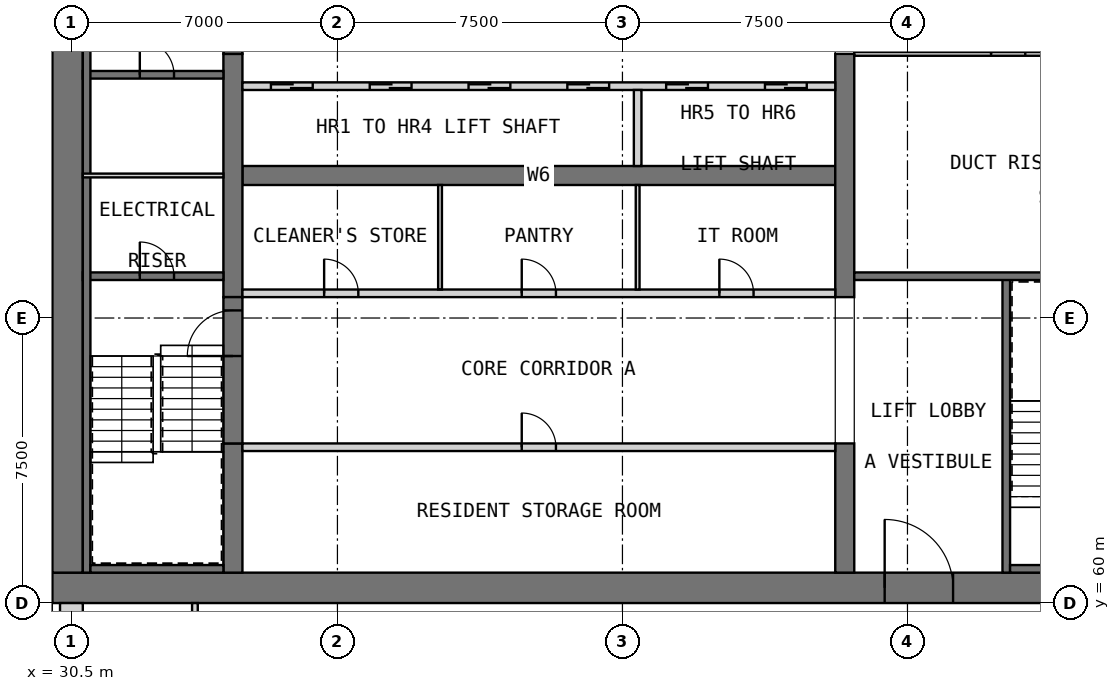
"""IFC4 building model, lengths in metres.
Left out: names, types, materials, properties, quantities, classifications, styles, units other than length and angle.
Written with IfcOpenShell. Run it as: python <this file> out.ifc"""

import sys

from ifc_helpers import new_model, si_unit, direction, frame, frame_2d, origin, place, context, subcontext, project, spatial, rectangle, extrude, element, fill, save


model = new_model("IFC4")
c1 = context("Model", 3, precision=1e-05, world=origin(), true_north=direction((0.0, 1.0)))
c2 = subcontext(c1, "Body", "Model", "MODEL_VIEW")
j1 = project(units=[si_unit("LENGTHUNIT", "METRE"), si_unit("PLANEANGLEUNIT", "RADIAN")], contexts=[c1])
p1 = place(None, origin())
s1 = spatial("IfcSite", under=j1, at=p1, CompositionType="ELEMENT")
p2 = place(p1, origin())
s2 = spatial("IfcBuilding", under=s1, at=p2, CompositionType="ELEMENT")
p3 = place(p2, frame((0.0, 0.0, 182.7)))
s3 = spatial("IfcBuildingStorey", under=s2, at=p3, CompositionType="ELEMENT", Elevation=182.7)
p4 = place(p3, frame((30.0, 60.4, 0.0), z_axis=(0.0, 0.0, 1.0), x_axis=(1.0, 0.0, 0.0)))
e1 = element("IfcWall", 1, at=p4, inside=s3, PredefinedType="SHEAR", context=c2, shape_type="SweptSolid", body=[
    extrude(rectangle(XDim=30.0, YDim=0.8, at=frame_2d((15.0, 0.0))), origin(), (0.0, 0.0, 1.0), 3.5),
])
p5 = place(p4, frame((21.9, 0.0, 0.0)))
e2 = element("IfcOpeningElement", 2, at=p5, cuts=e1, PredefinedType="OPENING", context=c2, shape_type="SweptSolid", body=[
    extrude(rectangle(XDim=1.8, YDim=2.1, at=frame_2d((0.9, 1.05))), frame((0.0, 0.41, 0.0), z_axis=(0.0, -1.0, 0.0), x_axis=(1.0, 0.0, 0.0)), (0.0, 0.0, 1.0), 0.82),
])
p6 = place(p4, frame((26.5, 0.0, 0.0)))
e3 = element("IfcOpeningElement", 3, at=p6, cuts=e1, PredefinedType="OPENING", context=c2, shape_type="SweptSolid", body=[
    extrude(rectangle(XDim=1.2, YDim=2.1, at=frame_2d((0.6, 1.05))), frame((0.0, 0.41, 0.0), z_axis=(0.0, -1.0, 0.0), x_axis=(1.0, 0.0, 0.0)), (0.0, 0.0, 1.0), 0.82),
])
p7 = place(p3, frame((30.4, 60.8, 0.0), z_axis=(0.0, 0.0, 1.0), x_axis=(0.0, 1.0, 0.0)))
e4 = element("IfcWall", 4, at=p7, inside=s3, PredefinedType="SHEAR", context=c2, shape_type="SweptSolid", body=[
    extrude(rectangle(XDim=20.9, YDim=0.8, at=frame_2d((10.45, 0.0))), origin(), (0.0, 0.0, 1.0), 3.5),
])
p8 = place(p3, frame((35.0, 71.25, 0.0), z_axis=(0.0, 0.0, 1.0), x_axis=(1.0, 0.0, 0.0)))
e5 = element("IfcWall", 5, at=p8, inside=s3, PredefinedType="SHEAR", context=c2, shape_type="SweptSolid", body=[
    extrude(rectangle(XDim=15.6, YDim=0.5, at=frame_2d((7.8, 0.0))), origin(), (0.0, 0.0, 1.0), 3.5),
])
p9 = place(p3, frame((34.75, 60.8, 0.0), z_axis=(0.0, 0.0, 1.0), x_axis=(0.0, 1.0, 0.0)))
e6 = element("IfcWall", 6, at=p9, inside=s3, PredefinedType="SHEAR", context=c2, shape_type="SweptSolid", body=[
    extrude(rectangle(XDim=3.4, YDim=0.5, at=frame_2d((1.7, 0.0))), origin(), (0.0, 0.0, 1.0), 3.5),
])
p10 = place(p3, frame((34.75, 68.05, 0.0), z_axis=(0.0, 0.0, 1.0), x_axis=(0.0, 1.0, 0.0)))
e7 = element("IfcWall", 7, at=p10, inside=s3, PredefinedType="SHEAR", context=c2, shape_type="SweptSolid", body=[
    extrude(rectangle(XDim=6.4, YDim=0.5, at=frame_2d((3.2, 0.0))), origin(), (0.0, 0.0, 1.0), 3.5),
])
p11 = place(p3, frame((50.85, 60.8, 0.0), z_axis=(0.0, 0.0, 1.0), x_axis=(0.0, 1.0, 0.0)))
e8 = element("IfcWall", 8, at=p11, inside=s3, PredefinedType="SHEAR", context=c2, shape_type="SweptSolid", body=[
    extrude(rectangle(XDim=3.4, YDim=0.5, at=frame_2d((1.7, 0.0))), origin(), (0.0, 0.0, 1.0), 3.5),
])
p12 = place(p3, frame((50.85, 68.05, 0.0), z_axis=(0.0, 0.0, 1.0), x_axis=(0.0, 1.0, 0.0)))
e9 = element("IfcWall", 9, at=p12, inside=s3, PredefinedType="SHEAR", context=c2, shape_type="SweptSolid", body=[
    extrude(rectangle(XDim=6.4, YDim=0.5, at=frame_2d((3.2, 0.0))), origin(), (0.0, 0.0, 1.0), 3.5),
])
p13 = place(p3, frame((30.5, 60.0, 0.0), z_axis=(0.0, 0.0, 1.0), x_axis=(0.0, -1.0, 0.0)))
e10 = element("IfcWall", 10, at=p13, inside=s3, PredefinedType="SOLIDWALL", context=c2, shape_type="SweptSolid", body=[
    extrude(rectangle(XDim=7.0, YDim=0.6, at=frame_2d((3.5, 0.0))), origin(), (0.0, 0.0, 1.0), 3.25),
])
p14 = place(p13, frame((4.175, 0.0, 0.8)))
e11 = element("IfcOpeningElement", 11, at=p14, cuts=e10, PredefinedType="OPENING", context=c2, shape_type="SweptSolid", body=[
    extrude(rectangle(XDim=2.4, YDim=1.8, at=frame_2d((1.2, 0.9))), frame((0.0, 0.31, 0.0), z_axis=(0.0, -1.0, 0.0), x_axis=(1.0, 0.0, 0.0)), (0.0, 0.0, 1.0), 0.62),
])
p15 = place(p13, frame((0.675, 0.0, 0.8)))
e12 = element("IfcOpeningElement", 12, at=p15, cuts=e10, PredefinedType="OPENING", context=c2, shape_type="SweptSolid", body=[
    extrude(rectangle(XDim=2.4, YDim=1.8, at=frame_2d((1.2, 0.9))), frame((0.0, 0.31, 0.0), z_axis=(0.0, -1.0, 0.0), x_axis=(1.0, 0.0, 0.0)), (0.0, 0.0, 1.0), 0.62),
])
p16 = place(p3, frame((35.0, 64.1, 0.0), z_axis=(0.0, 0.0, 1.0), x_axis=(1.0, 0.0, 0.0)))
e13 = element("IfcWall", 13, at=p16, inside=s3, PredefinedType="PARTITIONING", context=c2, shape_type="SweptSolid", body=[
    extrude(rectangle(XDim=15.6, YDim=0.2, at=frame_2d((7.8, 0.0))), origin(), (0.0, 0.0, 1.0), 3.25),
])
p17 = place(p16, frame((7.35, 0.0, 0.0)))
e14 = element("IfcOpeningElement", 14, at=p17, cuts=e13, PredefinedType="OPENING", context=c2, shape_type="SweptSolid", body=[
    extrude(rectangle(XDim=0.9, YDim=2.1, at=frame_2d((0.45, 1.05))), frame((0.0, 0.11, 0.0), z_axis=(0.0, -1.0, 0.0), x_axis=(1.0, 0.0, 0.0)), (0.0, 0.0, 1.0), 0.22),
])
p18 = place(p3, frame((35.0, 68.15, 0.0), z_axis=(0.0, 0.0, 1.0), x_axis=(1.0, 0.0, 0.0)))
e15 = element("IfcWall", 15, at=p18, inside=s3, PredefinedType="PARTITIONING", context=c2, shape_type="SweptSolid", body=[
    extrude(rectangle(XDim=15.6, YDim=0.2, at=frame_2d((7.8, 0.0))), origin(), (0.0, 0.0, 1.0), 3.25),
])
p19 = place(p18, frame((2.15, 0.0, 0.0)))
e16 = element("IfcOpeningElement", 16, at=p19, cuts=e15, PredefinedType="OPENING", context=c2, shape_type="SweptSolid", body=[
    extrude(rectangle(XDim=0.9, YDim=2.1, at=frame_2d((0.45, 1.05))), frame((0.0, 0.11, 0.0), z_axis=(0.0, -1.0, 0.0), x_axis=(1.0, 0.0, 0.0)), (0.0, 0.0, 1.0), 0.22),
])
p20 = place(p18, frame((7.35, 0.0, 0.0)))
e17 = element("IfcOpeningElement", 17, at=p20, cuts=e15, PredefinedType="OPENING", context=c2, shape_type="SweptSolid", body=[
    extrude(rectangle(XDim=0.9, YDim=2.1, at=frame_2d((0.45, 1.05))), frame((0.0, 0.11, 0.0), z_axis=(0.0, -1.0, 0.0), x_axis=(1.0, 0.0, 0.0)), (0.0, 0.0, 1.0), 0.22),
])
p21 = place(p18, frame((12.55, 0.0, 0.0)))
e18 = element("IfcOpeningElement", 18, at=p21, cuts=e15, PredefinedType="OPENING", context=c2, shape_type="SweptSolid", body=[
    extrude(rectangle(XDim=0.9, YDim=2.1, at=frame_2d((0.45, 1.05))), frame((0.0, 0.11, 0.0), z_axis=(0.0, -1.0, 0.0), x_axis=(1.0, 0.0, 0.0)), (0.0, 0.0, 1.0), 0.22),
])
for number, where, z_axis, x_axis in (
    (19, (40.2, 68.25, 0.0), (0.0, 0.0, 1.0), (0.0, 1.0, 0.0)),
    (20, (45.4, 68.25, 0.0), (0.0, 0.0, 1.0), (0.0, 1.0, 0.0)),
):
    element("IfcWall", number, at=place(p3, frame(where, z_axis=z_axis, x_axis=x_axis)), inside=s3, PredefinedType="PARTITIONING", context=c2, shape_type="SweptSolid", body=[
        extrude(rectangle(XDim=2.75, YDim=0.1, at=frame_2d((1.375, 0.0))), origin(), (0.0, 0.0, 1.0), 3.25),
    ])
p22 = place(p3, frame((35.0, 73.6, 0.0), z_axis=(0.0, 0.0, 1.0), x_axis=(1.0, 0.0, 0.0)))
e21 = element("IfcWall", 21, at=p22, inside=s3, PredefinedType="SOLIDWALL", context=c2, shape_type="SweptSolid", body=[
    extrude(rectangle(XDim=15.6, YDim=0.2, at=frame_2d((7.8, 0.0))), origin(), (0.0, 0.0, 1.0), 3.5),
])
p23 = place(p22, frame((0.75, 0.0, 0.0)))
e22 = element("IfcOpeningElement", 22, at=p23, cuts=e21, PredefinedType="OPENING", context=c2, shape_type="SweptSolid", body=[
    extrude(rectangle(XDim=1.1, YDim=2.1, at=frame_2d((0.55, 1.05))), frame((0.0, 0.11, 0.0), z_axis=(0.0, -1.0, 0.0), x_axis=(1.0, 0.0, 0.0)), (0.0, 0.0, 1.0), 0.22),
])
p24 = place(p22, frame((3.35, 0.0, 0.0)))
e23 = element("IfcOpeningElement", 23, at=p24, cuts=e21, PredefinedType="OPENING", context=c2, shape_type="SweptSolid", body=[
    extrude(rectangle(XDim=1.1, YDim=2.1, at=frame_2d((0.55, 1.05))), frame((0.0, 0.11, 0.0), z_axis=(0.0, -1.0, 0.0), x_axis=(1.0, 0.0, 0.0)), (0.0, 0.0, 1.0), 0.22),
])
p25 = place(p22, frame((5.95, 0.0, 0.0)))
e24 = element("IfcOpeningElement", 24, at=p25, cuts=e21, PredefinedType="OPENING", context=c2, shape_type="SweptSolid", body=[
    extrude(rectangle(XDim=1.1, YDim=2.1, at=frame_2d((0.55, 1.05))), frame((0.0, 0.11, 0.0), z_axis=(0.0, -1.0, 0.0), x_axis=(1.0, 0.0, 0.0)), (0.0, 0.0, 1.0), 0.22),
])
p26 = place(p22, frame((8.55, 0.0, 0.0)))
e25 = element("IfcOpeningElement", 25, at=p26, cuts=e21, PredefinedType="OPENING", context=c2, shape_type="SweptSolid", body=[
    extrude(rectangle(XDim=1.1, YDim=2.1, at=frame_2d((0.55, 1.05))), frame((0.0, 0.11, 0.0), z_axis=(0.0, -1.0, 0.0), x_axis=(1.0, 0.0, 0.0)), (0.0, 0.0, 1.0), 0.22),
])
p27 = place(p22, frame((11.15, 0.0, 0.0)))
e26 = element("IfcOpeningElement", 26, at=p27, cuts=e21, PredefinedType="OPENING", context=c2, shape_type="SweptSolid", body=[
    extrude(rectangle(XDim=1.1, YDim=2.1, at=frame_2d((0.55, 1.05))), frame((0.0, 0.11, 0.0), z_axis=(0.0, -1.0, 0.0), x_axis=(1.0, 0.0, 0.0)), (0.0, 0.0, 1.0), 0.22),
])
p28 = place(p22, frame((13.75, 0.0, 0.0)))
e27 = element("IfcOpeningElement", 27, at=p28, cuts=e21, PredefinedType="OPENING", context=c2, shape_type="SweptSolid", body=[
    extrude(rectangle(XDim=1.1, YDim=2.1, at=frame_2d((0.55, 1.05))), frame((0.0, 0.11, 0.0), z_axis=(0.0, -1.0, 0.0), x_axis=(1.0, 0.0, 0.0)), (0.0, 0.0, 1.0), 0.22),
])
p29 = place(p3, frame((45.4, 71.5, 0.0), z_axis=(0.0, 0.0, 1.0), x_axis=(0.0, 1.0, 0.0)))
e28 = element("IfcWall", 28, at=p29, inside=s3, PredefinedType="SOLIDWALL", context=c2, shape_type="SweptSolid", body=[
    extrude(rectangle(XDim=2.0, YDim=0.2, at=frame_2d((1.0, 0.0))), origin(), (0.0, 0.0, 1.0), 3.5),
])
p30 = place(p3, frame((34.75, 64.2, 0.0), z_axis=(0.0, 0.0, 1.0), x_axis=(0.0, 1.0, 0.0)))
e29 = element("IfcWall", 29, at=p30, inside=s3, PredefinedType="SOLIDWALL", context=c2, shape_type="SweptSolid", body=[
    extrude(rectangle(XDim=3.85, YDim=0.5, at=frame_2d((1.925, 0.0))), origin(), (0.0, 0.0, 1.0), 2.3),
])
p31 = place(p30, frame((2.3, 0.0, 0.0)))
e30 = element("IfcOpeningElement", 30, at=p31, cuts=e29, PredefinedType="OPENING", context=c2, shape_type="SweptSolid", body=[
    extrude(rectangle(XDim=1.2, YDim=2.1, at=frame_2d((0.6, 1.05))), frame((0.0, 0.26, 0.0), z_axis=(0.0, -1.0, 0.0), x_axis=(1.0, 0.0, 0.0)), (0.0, 0.0, 1.0), 0.52),
])
p32 = place(p3, frame((34.75, 74.45, 0.0), z_axis=(0.0, 0.0, 1.0), x_axis=(0.0, 1.0, 0.0)))
e31 = element("IfcWall", 31, at=p32, inside=s3, PredefinedType="SOLIDWALL", context=c2, shape_type="SweptSolid", body=[
    extrude(rectangle(XDim=3.85, YDim=0.5, at=frame_2d((1.925, 0.0))), origin(), (0.0, 0.0, 1.0), 2.3),
])
p33 = place(p32, frame((1.0, 0.0, 0.0)))
e32 = element("IfcOpeningElement", 32, at=p33, cuts=e31, PredefinedType="OPENING", context=c2, shape_type="SweptSolid", body=[
    extrude(rectangle(XDim=1.2, YDim=2.1, at=frame_2d((0.6, 1.05))), frame((0.0, 0.26, 0.0), z_axis=(0.0, -1.0, 0.0), x_axis=(1.0, 0.0, 0.0)), (0.0, 0.0, 1.0), 0.52),
])
p34 = place(p3, frame((30.8, 68.6, 0.0), z_axis=(0.0, 0.0, 1.0), x_axis=(1.0, 0.0, 0.0)))
e33 = element("IfcWall", 33, at=p34, inside=s3, PredefinedType="SOLIDWALL", context=c2, shape_type="SweptSolid", body=[
    extrude(rectangle(XDim=3.7, YDim=0.2, at=frame_2d((1.85, 0.0))), origin(), (0.0, 0.0, 1.0), 3.25),
])
p35 = place(p34, frame((1.5, 0.0, 0.0)))
e34 = element("IfcOpeningElement", 34, at=p35, cuts=e33, PredefinedType="OPENING", context=c2, shape_type="SweptSolid", body=[
    extrude(rectangle(XDim=0.9, YDim=2.1, at=frame_2d((0.45, 1.05))), frame((0.0, 0.11, 0.0), z_axis=(0.0, -1.0, 0.0), x_axis=(1.0, 0.0, 0.0)), (0.0, 0.0, 1.0), 0.22),
])
p36 = place(p3, frame((30.8, 73.9, 0.0), z_axis=(0.0, 0.0, 1.0), x_axis=(1.0, 0.0, 0.0)))
e35 = element("IfcWall", 35, at=p36, inside=s3, PredefinedType="SOLIDWALL", context=c2, shape_type="SweptSolid", body=[
    extrude(rectangle(XDim=3.7, YDim=0.2, at=frame_2d((1.85, 0.0))), origin(), (0.0, 0.0, 1.0), 3.25),
])
p37 = place(p36, frame((1.5, 0.0, 0.0)))
e36 = element("IfcOpeningElement", 36, at=p37, cuts=e35, PredefinedType="OPENING", context=c2, shape_type="SweptSolid", body=[
    extrude(rectangle(XDim=0.9, YDim=2.1, at=frame_2d((0.45, 1.05))), frame((0.0, 0.11, 0.0), z_axis=(0.0, -1.0, 0.0), x_axis=(1.0, 0.0, 0.0)), (0.0, 0.0, 1.0), 0.22),
])
p38 = place(p3, frame((55.1, 60.8, 0.0), z_axis=(0.0, 0.0, 1.0), x_axis=(0.0, 1.0, 0.0)))
e37 = element("IfcWall", 37, at=p38, inside=s3, PredefinedType="SOLIDWALL", context=c2, shape_type="SweptSolid", body=[
    extrude(rectangle(XDim=7.8, YDim=0.2, at=frame_2d((3.9, 0.0))), origin(), (0.0, 0.0, 1.0), 3.25),
])
p39 = place(p3, frame((51.1, 68.6, 0.0), z_axis=(0.0, 0.0, 1.0), x_axis=(1.0, 0.0, 0.0)))
e38 = element("IfcWall", 38, at=p39, inside=s3, PredefinedType="SOLIDWALL", context=c2, shape_type="SweptSolid", body=[
    extrude(rectangle(XDim=8.1, YDim=0.2, at=frame_2d((4.05, 0.0))), origin(), (0.0, 0.0, 1.0), 3.25),
])
p40 = place(p3, frame((30.9, 60.8, 0.0), z_axis=(0.0, 0.0, 1.0), x_axis=(0.0, 1.0, 0.0)))
e39 = element("IfcWall", 39, at=p40, inside=s3, PredefinedType="SOLIDWALL", context=c2, shape_type="SweptSolid", body=[
    extrude(rectangle(XDim=20.9, YDim=0.2, at=frame_2d((10.45, 0.0))), origin(), (0.0, 0.0, 1.0), 3.25),
])
p41 = place(p3, frame((31.0, 60.9, 0.0), z_axis=(0.0, 0.0, 1.0), x_axis=(1.0, 0.0, 0.0)))
e40 = element("IfcWall", 40, at=p41, inside=s3, PredefinedType="SOLIDWALL", context=c2, shape_type="SweptSolid", body=[
    extrude(rectangle(XDim=3.5, YDim=0.2, at=frame_2d((1.75, 0.0))), origin(), (0.0, 0.0, 1.0), 3.25),
])
p42 = place(p3, frame((55.2, 60.9, 0.0), z_axis=(0.0, 0.0, 1.0), x_axis=(1.0, 0.0, 0.0)))
e41 = element("IfcWall", 41, at=p42, inside=s3, PredefinedType="SOLIDWALL", context=c2, shape_type="SweptSolid", body=[
    extrude(rectangle(XDim=1.3, YDim=0.2, at=frame_2d((0.65, 0.0))), origin(), (0.0, 0.0, 1.0), 3.25),
])
p43 = place(p3, frame((30.8, 71.25, 0.0), z_axis=(0.0, 0.0, 1.0), x_axis=(1.0, 0.0, 0.0)))
e42 = element("IfcWall", 42, at=p43, inside=s3, PredefinedType="PARTITIONING", context=c2, shape_type="SweptSolid", body=[
    extrude(rectangle(XDim=3.7, YDim=0.1, at=frame_2d((1.85, 0.0))), origin(), (0.0, 0.0, 1.0), 3.25),
])
p44 = place(p3, frame((51.1, 74.45, 0.0), z_axis=(0.0, 0.0, 1.0), x_axis=(1.0, 0.0, 0.0)))
e43 = element("IfcWall", 43, at=p44, inside=s3, PredefinedType="PARTITIONING", context=c2, shape_type="SweptSolid", body=[
    extrude(rectangle(XDim=8.1, YDim=0.1, at=frame_2d((4.05, 0.0))), origin(), (0.0, 0.0, 1.0), 3.25),
])
p45 = place(p44, frame((3.6, 0.0, 0.0)))
e44 = element("IfcOpeningElement", 44, at=p45, cuts=e43, PredefinedType="OPENING", context=c2, shape_type="SweptSolid", body=[
    extrude(rectangle(XDim=0.9, YDim=2.1, at=frame_2d((0.45, 1.05))), frame((0.0, 0.06, 0.0), z_axis=(0.0, -1.0, 0.0), x_axis=(1.0, 0.0, 0.0)), (0.0, 0.0, 1.0), 0.12),
])
p46 = place(p3, frame((33.75, 57.975, 0.0), z_axis=(0.0, 0.0, 1.0), x_axis=(0.0, 1.0, 0.0)))
e45 = element("IfcWall", 45, at=p46, inside=s3, PredefinedType="PARTITIONING", context=c2, shape_type="SweptSolid", body=[
    extrude(rectangle(XDim=2.025, YDim=0.15, at=frame_2d((1.012, 0.0))), origin(), (0.0, 0.0, 1.0), 3.25),
])
p47 = place(p17, origin())
e46 = element("IfcDoor", 46, at=p47, inside=s3, OperationType="SINGLE_SWING_RIGHT", PredefinedType="DOOR", context=c2, shape_type="SweptSolid", body=[
    extrude(rectangle(XDim=0.9, YDim=2.1, at=frame_2d((0.45, 1.05))), frame((0.0, 0.025, 0.0), z_axis=(0.0, -1.0, 0.0), x_axis=(1.0, 0.0, 0.0)), (0.0, 0.0, 1.0), 0.05),
])
fill(e14, e46)
p48 = place(p19, origin())
e47 = element("IfcDoor", 47, at=p48, inside=s3, OperationType="SINGLE_SWING_RIGHT", PredefinedType="DOOR", context=c2, shape_type="SweptSolid", body=[
    extrude(rectangle(XDim=0.9, YDim=2.1, at=frame_2d((0.45, 1.05))), frame((0.0, 0.025, 0.0), z_axis=(0.0, -1.0, 0.0), x_axis=(1.0, 0.0, 0.0)), (0.0, 0.0, 1.0), 0.05),
])
fill(e16, e47)
p49 = place(p20, origin())
e48 = element("IfcDoor", 48, at=p49, inside=s3, OperationType="SINGLE_SWING_LEFT", PredefinedType="DOOR", context=c2, shape_type="SweptSolid", body=[
    extrude(rectangle(XDim=0.9, YDim=2.1, at=frame_2d((0.45, 1.05))), frame((0.0, 0.025, 0.0), z_axis=(0.0, -1.0, 0.0), x_axis=(1.0, 0.0, 0.0)), (0.0, 0.0, 1.0), 0.05),
])
fill(e17, e48)
p50 = place(p21, origin())
e49 = element("IfcDoor", 49, at=p50, inside=s3, OperationType="SINGLE_SWING_RIGHT", PredefinedType="DOOR", context=c2, shape_type="SweptSolid", body=[
    extrude(rectangle(XDim=0.9, YDim=2.1, at=frame_2d((0.45, 1.05))), frame((0.0, 0.025, 0.0), z_axis=(0.0, -1.0, 0.0), x_axis=(1.0, 0.0, 0.0)), (0.0, 0.0, 1.0), 0.05),
])
fill(e18, e49)
p51 = place(p23, origin())
e50 = element("IfcDoor", 50, at=p51, inside=s3, OperationType="DOUBLE_DOOR_SLIDING", PredefinedType="DOOR", context=c2, shape_type="SweptSolid", body=[
    extrude(rectangle(XDim=1.1, YDim=2.1, at=frame_2d((0.55, 1.05))), frame((0.0, 0.025, 0.0), z_axis=(0.0, -1.0, 0.0), x_axis=(1.0, 0.0, 0.0)), (0.0, 0.0, 1.0), 0.05),
])
fill(e22, e50)
p52 = place(p24, origin())
e51 = element("IfcDoor", 51, at=p52, inside=s3, OperationType="DOUBLE_DOOR_SLIDING", PredefinedType="DOOR", context=c2, shape_type="SweptSolid", body=[
    extrude(rectangle(XDim=1.1, YDim=2.1, at=frame_2d((0.55, 1.05))), frame((0.0, 0.025, 0.0), z_axis=(0.0, -1.0, 0.0), x_axis=(1.0, 0.0, 0.0)), (0.0, 0.0, 1.0), 0.05),
])
fill(e23, e51)
p53 = place(p25, origin())
e52 = element("IfcDoor", 52, at=p53, inside=s3, OperationType="DOUBLE_DOOR_SLIDING", PredefinedType="DOOR", context=c2, shape_type="SweptSolid", body=[
    extrude(rectangle(XDim=1.1, YDim=2.1, at=frame_2d((0.55, 1.05))), frame((0.0, 0.025, 0.0), z_axis=(0.0, -1.0, 0.0), x_axis=(1.0, 0.0, 0.0)), (0.0, 0.0, 1.0), 0.05),
])
fill(e24, e52)
p54 = place(p26, origin())
e53 = element("IfcDoor", 53, at=p54, inside=s3, OperationType="DOUBLE_DOOR_SLIDING", PredefinedType="DOOR", context=c2, shape_type="SweptSolid", body=[
    extrude(rectangle(XDim=1.1, YDim=2.1, at=frame_2d((0.55, 1.05))), frame((0.0, 0.025, 0.0), z_axis=(0.0, -1.0, 0.0), x_axis=(1.0, 0.0, 0.0)), (0.0, 0.0, 1.0), 0.05),
])
fill(e25, e53)
p55 = place(p27, origin())
e54 = element("IfcDoor", 54, at=p55, inside=s3, OperationType="DOUBLE_DOOR_SLIDING", PredefinedType="DOOR", context=c2, shape_type="SweptSolid", body=[
    extrude(rectangle(XDim=1.1, YDim=2.1, at=frame_2d((0.55, 1.05))), frame((0.0, 0.025, 0.0), z_axis=(0.0, -1.0, 0.0), x_axis=(1.0, 0.0, 0.0)), (0.0, 0.0, 1.0), 0.05),
])
fill(e26, e54)
p56 = place(p28, origin())
e55 = element("IfcDoor", 55, at=p56, inside=s3, OperationType="DOUBLE_DOOR_SLIDING", PredefinedType="DOOR", context=c2, shape_type="SweptSolid", body=[
    extrude(rectangle(XDim=1.1, YDim=2.1, at=frame_2d((0.55, 1.05))), frame((0.0, 0.025, 0.0), z_axis=(0.0, -1.0, 0.0), x_axis=(1.0, 0.0, 0.0)), (0.0, 0.0, 1.0), 0.05),
])
fill(e27, e55)
p57 = place(p5, origin())
e56 = element("IfcDoor", 56, at=p57, inside=s3, OperationType="DOUBLE_DOOR_SINGLE_SWING", PredefinedType="DOOR", context=c2, shape_type="SweptSolid", body=[
    extrude(rectangle(XDim=1.8, YDim=2.1, at=frame_2d((0.9, 1.05))), frame((0.0, 0.025, 0.0), z_axis=(0.0, -1.0, 0.0), x_axis=(1.0, 0.0, 0.0)), (0.0, 0.0, 1.0), 0.05),
])
fill(e2, e56)
p58 = place(p31, origin())
e57 = element("IfcDoor", 57, at=p58, inside=s3, OperationType="SINGLE_SWING_LEFT", PredefinedType="DOOR", context=c2, shape_type="SweptSolid", body=[
    extrude(rectangle(XDim=1.2, YDim=2.1, at=frame_2d((0.6, 1.05))), frame((0.0, 0.025, 0.0), z_axis=(0.0, -1.0, 0.0), x_axis=(1.0, 0.0, 0.0)), (0.0, 0.0, 1.0), 0.05),
])
fill(e30, e57)
p59 = place(p35, origin())
e58 = element("IfcDoor", 58, at=p59, inside=s3, OperationType="SINGLE_SWING_LEFT", PredefinedType="DOOR", context=c2, shape_type="SweptSolid", body=[
    extrude(rectangle(XDim=0.9, YDim=2.1, at=frame_2d((0.45, 1.05))), frame((0.0, 0.025, 0.0), z_axis=(0.0, -1.0, 0.0), x_axis=(1.0, 0.0, 0.0)), (0.0, 0.0, 1.0), 0.05),
])
fill(e34, e58)
p60 = place(p37, origin())
e59 = element("IfcDoor", 59, at=p60, inside=s3, OperationType="SINGLE_SWING_RIGHT", PredefinedType="DOOR", context=c2, shape_type="SweptSolid", body=[
    extrude(rectangle(XDim=0.9, YDim=2.1, at=frame_2d((0.45, 1.05))), frame((0.0, 0.025, 0.0), z_axis=(0.0, -1.0, 0.0), x_axis=(1.0, 0.0, 0.0)), (0.0, 0.0, 1.0), 0.05),
])
fill(e36, e59)
p61 = place(p45, origin())
e60 = element("IfcDoor", 60, at=p61, inside=s3, OperationType="SINGLE_SWING_RIGHT", PredefinedType="DOOR", context=c2, shape_type="SweptSolid", body=[
    extrude(rectangle(XDim=0.9, YDim=2.1, at=frame_2d((0.45, 1.05))), frame((0.0, 0.025, 0.0), z_axis=(0.0, -1.0, 0.0), x_axis=(1.0, 0.0, 0.0)), (0.0, 0.0, 1.0), 0.05),
])
fill(e44, e60)
save(model, sys.argv[1])
